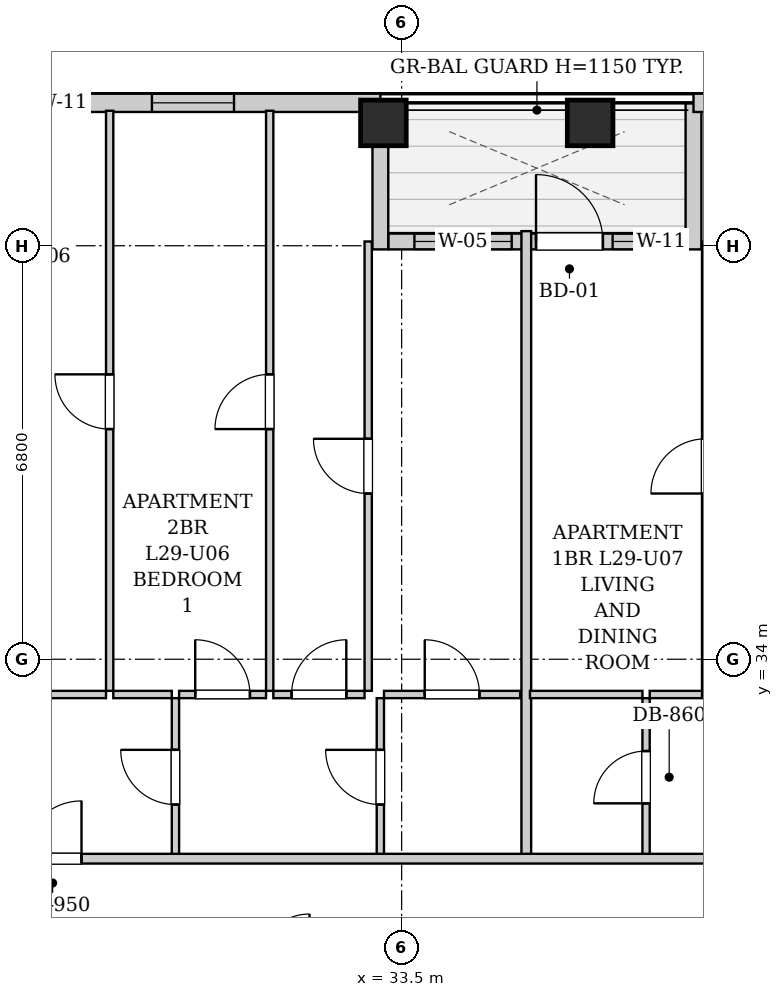
"""IFC4 building model, lengths in metres.
Left out: names, types, materials, properties, quantities, classifications, styles, units other than length and angle.
Written with IfcOpenShell. Run it as: python <this file> out.ifc"""

import sys

from ifc_helpers import new_model, si_unit, direction, frame, frame_2d, origin, origin_2d, place, context, subcontext, project, spatial, rectangle, extrude, element, fill, save


model = new_model("IFC4")
c1 = context("Model", 3, precision=1e-05, world=origin(), true_north=direction((0.0, 1.0)))
c2 = subcontext(c1, "Body", "Model", "MODEL_VIEW")
j1 = project(units=[si_unit("LENGTHUNIT", "METRE"), si_unit("PLANEANGLEUNIT", "RADIAN")], contexts=[c1])
p1 = place(None, origin())
s1 = spatial("IfcSite", under=j1, at=p1, CompositionType="ELEMENT")
p2 = place(p1, origin())
s2 = spatial("IfcBuilding", under=s1, at=p2, CompositionType="ELEMENT")
p3 = place(p2, frame((0.0, 0.0, 103.9)))
s3 = spatial("IfcBuildingStorey", under=s2, at=p3, CompositionType="ELEMENT", Elevation=103.9)
for number, where, z_axis, x_axis in (
    (1, (33.2, 42.82, 0.0), (0.0, 0.0, 1.0), (1.0, 0.0, 0.0)),
    (2, (36.6, 42.82, 0.0), (0.0, 0.0, 1.0), (1.0, 0.0, 0.0)),
):
    element("IfcColumn", number, at=place(p3, frame(where, z_axis=z_axis, x_axis=x_axis)), inside=s3, PredefinedType="COLUMN", context=c2, shape_type="SweptSolid", body=[
        extrude(rectangle(XDim=0.75, YDim=0.75, at=origin_2d()), origin(), (0.0, 0.0, 1.0), 3.2),
    ])
p4 = place(p3, frame((10.0, 43.15, 0.0), z_axis=(0.0, 0.0, 1.0), x_axis=(1.0, 0.0, 0.0)))
e3 = element("IfcWall", 3, at=p4, inside=s3, PredefinedType="SOLIDWALL", context=c2, shape_type="SweptSolid", body=[
    extrude(rectangle(XDim=23.15, YDim=0.3, at=frame_2d((11.575, 0.0))), origin(), (0.0, 0.0, 1.0), 2.94),
])
p5 = place(p4, frame((4.735, 0.0, 0.55)))
e4 = element("IfcOpeningElement", 4, at=p5, cuts=e3, PredefinedType="OPENING", context=c2, shape_type="SweptSolid", body=[
    extrude(rectangle(XDim=1.35, YDim=1.2, at=frame_2d((0.675, 0.6))), frame((0.0, 0.16, 0.0), z_axis=(0.0, -1.0, 0.0), x_axis=(1.0, 0.0, 0.0)), (0.0, 0.0, 1.0), 0.32),
])
p6 = place(p4, frame((1.27, 0.0, 0.55)))
e5 = element("IfcOpeningElement", 5, at=p6, cuts=e3, PredefinedType="OPENING", context=c2, shape_type="SweptSolid", body=[
    extrude(rectangle(XDim=1.35, YDim=1.2, at=frame_2d((0.675, 0.6))), frame((0.0, 0.16, 0.0), z_axis=(0.0, -1.0, 0.0), x_axis=(1.0, 0.0, 0.0)), (0.0, 0.0, 1.0), 0.32),
])
p7 = place(p4, frame((9.773, 0.0, 0.55)))
e6 = element("IfcOpeningElement", 6, at=p7, cuts=e3, PredefinedType="OPENING", context=c2, shape_type="SweptSolid", body=[
    extrude(rectangle(XDim=1.35, YDim=1.2, at=frame_2d((0.675, 0.6))), frame((0.0, 0.16, 0.0), z_axis=(0.0, -1.0, 0.0), x_axis=(1.0, 0.0, 0.0)), (0.0, 0.0, 1.0), 0.32),
])
p8 = place(p4, frame((17.5, 0.0, 0.55)))
e7 = element("IfcOpeningElement", 7, at=p8, cuts=e3, PredefinedType="OPENING", context=c2, shape_type="SweptSolid", body=[
    extrude(rectangle(XDim=0.85, YDim=1.2, at=frame_2d((0.425, 0.6))), frame((0.0, 0.16, 0.0), z_axis=(0.0, -1.0, 0.0), x_axis=(1.0, 0.0, 0.0)), (0.0, 0.0, 1.0), 0.32),
])
p9 = place(p4, frame((19.393, 0.0, 0.55)))
e8 = element("IfcOpeningElement", 8, at=p9, cuts=e3, PredefinedType="OPENING", context=c2, shape_type="SweptSolid", body=[
    extrude(rectangle(XDim=1.35, YDim=1.2, at=frame_2d((0.675, 0.6))), frame((0.0, 0.16, 0.0), z_axis=(0.0, -1.0, 0.0), x_axis=(1.0, 0.0, 0.0)), (0.0, 0.0, 1.0), 0.32),
])
p10 = place(p3, frame((33.15, 43.14, 0.0), z_axis=(0.0, 0.0, 1.0), x_axis=(0.0, -1.0, 0.0)))
e9 = element("IfcWall", 9, at=p10, inside=s3, PredefinedType="SOLIDWALL", context=c2, shape_type="SweptSolid", body=[
    extrude(rectangle(XDim=2.4, YDim=0.26, at=frame_2d((1.2, 0.0))), origin(), (0.0, 0.0, 1.0), 2.313),
])
p11 = place(p3, frame((33.284, 40.87, 0.0), z_axis=(0.0, 0.0, 1.0), x_axis=(1.0, 0.0, 0.0)))
e10 = element("IfcWall", 10, at=p11, inside=s3, PredefinedType="SOLIDWALL", context=c2, shape_type="SweptSolid", body=[
    extrude(rectangle(XDim=4.882, YDim=0.26, at=frame_2d((2.441, 0.0))), origin(), (0.0, 0.0, 1.0), 2.94),
])
p12 = place(p11, frame((2.426, 0.0, 0.0)))
e11 = element("IfcOpeningElement", 11, at=p12, cuts=e10, PredefinedType="OPENING", context=c2, shape_type="SweptSolid", body=[
    extrude(rectangle(XDim=1.1, YDim=2.0, at=frame_2d((0.55, 1.0))), frame((0.0, 0.14, 0.0), z_axis=(0.0, -1.0, 0.0), x_axis=(1.0, 0.0, 0.0)), (0.0, 0.0, 1.0), 0.28),
])
p13 = place(p11, frame((0.426, 0.0, 0.85)))
e12 = element("IfcOpeningElement", 12, at=p13, cuts=e10, PredefinedType="OPENING", context=c2, shape_type="SweptSolid", body=[
    extrude(rectangle(XDim=1.6, YDim=1.65, at=frame_2d((0.8, 0.825))), frame((0.0, 0.14, 0.0), z_axis=(0.0, -1.0, 0.0), x_axis=(1.0, 0.0, 0.0)), (0.0, 0.0, 1.0), 0.28),
])
p14 = place(p11, frame((3.686, 0.0, 0.55)))
e13 = element("IfcOpeningElement", 13, at=p14, cuts=e10, PredefinedType="OPENING", context=c2, shape_type="SweptSolid", body=[
    extrude(rectangle(XDim=0.85, YDim=1.2, at=frame_2d((0.425, 0.6))), frame((0.0, 0.14, 0.0), z_axis=(0.0, -1.0, 0.0), x_axis=(1.0, 0.0, 0.0)), (0.0, 0.0, 1.0), 0.28),
])
p15 = place(p3, frame((38.3, 40.74, 0.0), z_axis=(0.0, 0.0, 1.0), x_axis=(0.0, 1.0, 0.0)))
e14 = element("IfcWall", 14, at=p15, inside=s3, PredefinedType="SOLIDWALL", context=c2, shape_type="SweptSolid", body=[
    extrude(rectangle(XDim=2.4, YDim=0.26, at=frame_2d((1.2, 0.0))), origin(), (0.0, 0.0, 1.0), 2.94),
])
p16 = place(p3, frame((38.3, 43.15, 0.0), z_axis=(0.0, 0.0, 1.0), x_axis=(1.0, 0.0, 0.0)))
e15 = element("IfcWall", 15, at=p16, inside=s3, PredefinedType="SOLIDWALL", context=c2, shape_type="SweptSolid", body=[
    extrude(rectangle(XDim=2.6, YDim=0.3, at=frame_2d((1.3, 0.0))), origin(), (0.0, 0.0, 1.0), 2.94),
])
p17 = place(p16, frame((0.615, 0.0, 0.55)))
e16 = element("IfcOpeningElement", 16, at=p17, cuts=e15, PredefinedType="OPENING", context=c2, shape_type="SweptSolid", body=[
    extrude(rectangle(XDim=0.85, YDim=1.2, at=frame_2d((0.425, 0.6))), frame((0.0, 0.16, 0.0), z_axis=(0.0, -1.0, 0.0), x_axis=(1.0, 0.0, 0.0)), (0.0, 0.0, 1.0), 0.32),
])
p18 = place(p3, frame((29.78, 30.76, 0.0), z_axis=(0.0, 0.0, 1.0), x_axis=(0.0, 1.0, 0.0)))
e17 = element("IfcWall", 17, at=p18, inside=s3, PredefinedType="PARTITIONING", context=c2, shape_type="SweptSolid", body=[
    extrude(rectangle(XDim=2.6, YDim=0.12, at=frame_2d((1.3, 0.0))), origin(), (0.0, 0.0, 1.0), 2.94),
])
p19 = place(p18, frame((0.85, 0.0, 0.0)))
e18 = element("IfcOpeningElement", 18, at=p19, cuts=e17, PredefinedType="OPENING", context=c2, shape_type="SweptSolid", body=[
    extrude(rectangle(XDim=0.9, YDim=2.05, at=frame_2d((0.45, 1.025))), frame((0.0, 0.07, 0.0), z_axis=(0.0, -1.0, 0.0), x_axis=(1.0, 0.0, 0.0)), (0.0, 0.0, 1.0), 0.14),
])
p20 = place(p3, frame((25.8, 33.42, 0.0), z_axis=(0.0, 0.0, 1.0), x_axis=(1.0, 0.0, 0.0)))
e19 = element("IfcWall", 19, at=p20, inside=s3, PredefinedType="PARTITIONING", context=c2, shape_type="SweptSolid", body=[
    extrude(rectangle(XDim=2.838, YDim=0.12, at=frame_2d((1.419, 0.0))), origin(), (0.0, 0.0, 1.0), 2.94),
])
p21 = place(p20, frame((0.969, 0.0, 0.0)))
e20 = element("IfcOpeningElement", 20, at=p21, cuts=e19, PredefinedType="OPENING", context=c2, shape_type="SweptSolid", body=[
    extrude(rectangle(XDim=0.9, YDim=2.05, at=frame_2d((0.45, 1.025))), frame((0.0, 0.07, 0.0), z_axis=(0.0, -1.0, 0.0), x_axis=(1.0, 0.0, 0.0)), (0.0, 0.0, 1.0), 0.14),
])
p22 = place(p3, frame((28.758, 33.42, 0.0), z_axis=(0.0, 0.0, 1.0), x_axis=(1.0, 0.0, 0.0)))
e21 = element("IfcWall", 21, at=p22, inside=s3, PredefinedType="PARTITIONING", context=c2, shape_type="SweptSolid", body=[
    extrude(rectangle(XDim=0.962, YDim=0.12, at=frame_2d((0.481, 0.0))), origin(), (0.0, 0.0, 1.0), 2.94),
])
p23 = place(p3, frame((33.15, 30.76, 0.0), z_axis=(0.0, 0.0, 1.0), x_axis=(0.0, 1.0, 0.0)))
e22 = element("IfcWall", 22, at=p23, inside=s3, PredefinedType="PARTITIONING", context=c2, shape_type="SweptSolid", body=[
    extrude(rectangle(XDim=2.6, YDim=0.12, at=frame_2d((1.3, 0.0))), origin(), (0.0, 0.0, 1.0), 2.313),
])
p24 = place(p23, frame((0.85, 0.0, 0.0)))
e23 = element("IfcOpeningElement", 23, at=p24, cuts=e22, PredefinedType="OPENING", context=c2, shape_type="SweptSolid", body=[
    extrude(rectangle(XDim=0.9, YDim=2.05, at=frame_2d((0.45, 1.025))), frame((0.0, 0.07, 0.0), z_axis=(0.0, -1.0, 0.0), x_axis=(1.0, 0.0, 0.0)), (0.0, 0.0, 1.0), 0.14),
])
p25 = place(p3, frame((29.84, 33.42, 0.0), z_axis=(0.0, 0.0, 1.0), x_axis=(1.0, 0.0, 0.0)))
e24 = element("IfcWall", 24, at=p25, inside=s3, PredefinedType="PARTITIONING", context=c2, shape_type="SweptSolid", body=[
    extrude(rectangle(XDim=1.43, YDim=0.12, at=frame_2d((0.715, 0.0))), origin(), (0.0, 0.0, 1.0), 2.94),
])
p26 = place(p25, frame((0.265, 0.0, 0.0)))
e25 = element("IfcOpeningElement", 25, at=p26, cuts=e24, PredefinedType="OPENING", context=c2, shape_type="SweptSolid", body=[
    extrude(rectangle(XDim=0.9, YDim=2.05, at=frame_2d((0.45, 1.025))), frame((0.0, 0.07, 0.0), z_axis=(0.0, -1.0, 0.0), x_axis=(1.0, 0.0, 0.0)), (0.0, 0.0, 1.0), 0.14),
])
p27 = place(p3, frame((31.39, 33.42, 0.0), z_axis=(0.0, 0.0, 1.0), x_axis=(1.0, 0.0, 0.0)))
e26 = element("IfcWall", 26, at=p27, inside=s3, PredefinedType="PARTITIONING", context=c2, shape_type="SweptSolid", body=[
    extrude(rectangle(XDim=1.5, YDim=0.12, at=frame_2d((0.75, 0.0))), origin(), (0.0, 0.0, 1.0), 2.94),
])
p28 = place(p27, frame((0.3, 0.0, 0.0)))
e27 = element("IfcOpeningElement", 27, at=p28, cuts=e26, PredefinedType="OPENING", context=c2, shape_type="SweptSolid", body=[
    extrude(rectangle(XDim=0.9, YDim=2.05, at=frame_2d((0.45, 1.025))), frame((0.0, 0.07, 0.0), z_axis=(0.0, -1.0, 0.0), x_axis=(1.0, 0.0, 0.0)), (0.0, 0.0, 1.0), 0.14),
])
p29 = place(p3, frame((33.21, 33.42, 0.0), z_axis=(0.0, 0.0, 1.0), x_axis=(1.0, 0.0, 0.0)))
e28 = element("IfcWall", 28, at=p29, inside=s3, PredefinedType="PARTITIONING", context=c2, shape_type="SweptSolid", body=[
    extrude(rectangle(XDim=2.24, YDim=0.12, at=frame_2d((1.12, 0.0))), origin(), (0.0, 0.0, 1.0), 2.94),
])
p30 = place(p29, frame((0.67, 0.0, 0.0)))
e29 = element("IfcOpeningElement", 29, at=p30, cuts=e28, PredefinedType="OPENING", context=c2, shape_type="SweptSolid", body=[
    extrude(rectangle(XDim=0.9, YDim=2.05, at=frame_2d((0.45, 1.025))), frame((0.0, 0.07, 0.0), z_axis=(0.0, -1.0, 0.0), x_axis=(1.0, 0.0, 0.0)), (0.0, 0.0, 1.0), 0.14),
])
p31 = place(p3, frame((28.698, 33.48, 0.0), z_axis=(0.0, 0.0, 1.0), x_axis=(0.0, 1.0, 0.0)))
e30 = element("IfcWall", 30, at=p31, inside=s3, PredefinedType="PARTITIONING", context=c2, shape_type="SweptSolid", body=[
    extrude(rectangle(XDim=9.54, YDim=0.12, at=frame_2d((4.77, 0.0))), origin(), (0.0, 0.0, 1.0), 2.94),
])
p32 = place(p31, frame((4.305, 0.0, 0.0)))
e31 = element("IfcOpeningElement", 31, at=p32, cuts=e30, PredefinedType="OPENING", context=c2, shape_type="SweptSolid", body=[
    extrude(rectangle(XDim=0.9, YDim=2.05, at=frame_2d((0.45, 1.025))), frame((0.0, 0.07, 0.0), z_axis=(0.0, -1.0, 0.0), x_axis=(1.0, 0.0, 0.0)), (0.0, 0.0, 1.0), 0.14),
])
p33 = place(p3, frame((31.33, 33.48, 0.0), z_axis=(0.0, 0.0, 1.0), x_axis=(0.0, 1.0, 0.0)))
e32 = element("IfcWall", 32, at=p33, inside=s3, PredefinedType="PARTITIONING", context=c2, shape_type="SweptSolid", body=[
    extrude(rectangle(XDim=9.54, YDim=0.12, at=frame_2d((4.77, 0.0))), origin(), (0.0, 0.0, 1.0), 2.94),
])
p34 = place(p33, frame((4.305, 0.0, 0.0)))
e33 = element("IfcOpeningElement", 33, at=p34, cuts=e32, PredefinedType="OPENING", context=c2, shape_type="SweptSolid", body=[
    extrude(rectangle(XDim=0.9, YDim=2.05, at=frame_2d((0.45, 1.025))), frame((0.0, 0.07, 0.0), z_axis=(0.0, -1.0, 0.0), x_axis=(1.0, 0.0, 0.0)), (0.0, 0.0, 1.0), 0.14),
])
p35 = place(p3, frame((32.95, 33.48, 0.0), z_axis=(0.0, 0.0, 1.0), x_axis=(0.0, 1.0, 0.0)))
e34 = element("IfcWall", 34, at=p35, inside=s3, PredefinedType="PARTITIONING", context=c2, shape_type="SweptSolid", body=[
    extrude(rectangle(XDim=7.39, YDim=0.12, at=frame_2d((3.695, 0.0))), origin(), (0.0, 0.0, 1.0), 2.94),
])
p36 = place(p35, frame((3.245, 0.0, 0.0)))
e35 = element("IfcOpeningElement", 35, at=p36, cuts=e34, PredefinedType="OPENING", context=c2, shape_type="SweptSolid", body=[
    extrude(rectangle(XDim=0.9, YDim=2.05, at=frame_2d((0.45, 1.025))), frame((0.0, 0.07, 0.0), z_axis=(0.0, -1.0, 0.0), x_axis=(1.0, 0.0, 0.0)), (0.0, 0.0, 1.0), 0.14),
])
p37 = place(p3, frame((35.55, 30.76, 0.0), z_axis=(0.0, 0.0, 1.0), x_axis=(0.0, 1.0, 0.0)))
e36 = element("IfcWall", 36, at=p37, inside=s3, PredefinedType="PARTITIONING", context=c2, shape_type="SweptSolid", body=[
    extrude(rectangle(XDim=10.28, YDim=0.16, at=frame_2d((5.14, 0.0))), origin(), (0.0, 0.0, 1.0), 2.94),
])
p38 = place(p3, frame((37.52, 30.76, 0.0), z_axis=(0.0, 0.0, 1.0), x_axis=(0.0, 1.0, 0.0)))
e37 = element("IfcWall", 37, at=p38, inside=s3, PredefinedType="PARTITIONING", context=c2, shape_type="SweptSolid", body=[
    extrude(rectangle(XDim=2.6, YDim=0.12, at=frame_2d((1.3, 0.0))), origin(), (0.0, 0.0, 1.0), 2.94),
])
p39 = place(p38, frame((0.87, 0.0, 0.0)))
e38 = element("IfcOpeningElement", 38, at=p39, cuts=e37, PredefinedType="OPENING", context=c2, shape_type="SweptSolid", body=[
    extrude(rectangle(XDim=0.86, YDim=2.05, at=frame_2d((0.43, 1.025))), frame((0.0, 0.07, 0.0), z_axis=(0.0, -1.0, 0.0), x_axis=(1.0, 0.0, 0.0)), (0.0, 0.0, 1.0), 0.14),
])
p40 = place(p3, frame((35.61, 33.42, 0.0), z_axis=(0.0, 0.0, 1.0), x_axis=(1.0, 0.0, 0.0)))
e39 = element("IfcWall", 39, at=p40, inside=s3, PredefinedType="PARTITIONING", context=c2, shape_type="SweptSolid", body=[
    extrude(rectangle(XDim=1.85, YDim=0.12, at=frame_2d((0.925, 0.0))), origin(), (0.0, 0.0, 1.0), 2.94),
])
p41 = place(p3, frame((37.58, 33.42, 0.0), z_axis=(0.0, 0.0, 1.0), x_axis=(1.0, 0.0, 0.0)))
e40 = element("IfcWall", 40, at=p41, inside=s3, PredefinedType="PARTITIONING", context=c2, shape_type="SweptSolid", body=[
    extrude(rectangle(XDim=0.86, YDim=0.12, at=frame_2d((0.43, 0.0))), origin(), (0.0, 0.0, 1.0), 2.94),
])
p42 = place(p3, frame((38.5, 33.48, 0.0), z_axis=(0.0, 0.0, 1.0), x_axis=(0.0, 1.0, 0.0)))
e41 = element("IfcWall", 41, at=p42, inside=s3, PredefinedType="PARTITIONING", context=c2, shape_type="SweptSolid", body=[
    extrude(rectangle(XDim=7.39, YDim=0.12, at=frame_2d((3.695, 0.0))), origin(), (0.0, 0.0, 1.0), 2.94),
])
p43 = place(p42, frame((3.245, 0.0, 0.0)))
e42 = element("IfcOpeningElement", 42, at=p43, cuts=e41, PredefinedType="OPENING", context=c2, shape_type="SweptSolid", body=[
    extrude(rectangle(XDim=0.9, YDim=2.05, at=frame_2d((0.45, 1.025))), frame((0.0, 0.07, 0.0), z_axis=(0.0, -1.0, 0.0), x_axis=(1.0, 0.0, 0.0)), (0.0, 0.0, 1.0), 0.14),
])
p44 = place(p3, frame((10.05, 30.72, 0.0), z_axis=(0.0, 0.0, 1.0), x_axis=(1.0, 0.0, 0.0)))
e43 = element("IfcWall", 43, at=p44, inside=s3, PredefinedType="PARTITIONING", context=c2, shape_type="SweptSolid", body=[
    extrude(rectangle(XDim=30.8, YDim=0.16, at=frame_2d((15.4, 0.0))), origin(), (0.0, 0.0, 1.0), 2.94),
])
p45 = place(p44, frame((3.692, 0.0, 0.0)))
e44 = element("IfcOpeningElement", 44, at=p45, cuts=e43, PredefinedType="OPENING", context=c2, shape_type="SweptSolid", body=[
    extrude(rectangle(XDim=0.95, YDim=2.1, at=frame_2d((0.475, 1.05))), frame((0.0, 0.09, 0.0), z_axis=(0.0, -1.0, 0.0), x_axis=(1.0, 0.0, 0.0)), (0.0, 0.0, 1.0), 0.18),
])
p46 = place(p44, frame((11.785, 0.0, 0.0)))
e45 = element("IfcOpeningElement", 45, at=p46, cuts=e43, PredefinedType="OPENING", context=c2, shape_type="SweptSolid", body=[
    extrude(rectangle(XDim=0.95, YDim=2.1, at=frame_2d((0.475, 1.05))), frame((0.0, 0.09, 0.0), z_axis=(0.0, -1.0, 0.0), x_axis=(1.0, 0.0, 0.0)), (0.0, 0.0, 1.0), 0.18),
])
p47 = place(p44, frame((17.235, 0.0, 0.0)))
e46 = element("IfcOpeningElement", 46, at=p47, cuts=e43, PredefinedType="OPENING", context=c2, shape_type="SweptSolid", body=[
    extrude(rectangle(XDim=0.95, YDim=2.1, at=frame_2d((0.475, 1.05))), frame((0.0, 0.09, 0.0), z_axis=(0.0, -1.0, 0.0), x_axis=(1.0, 0.0, 0.0)), (0.0, 0.0, 1.0), 0.18),
])
p48 = place(p44, frame((28.64, 0.0, 0.0)))
e47 = element("IfcOpeningElement", 47, at=p48, cuts=e43, PredefinedType="OPENING", context=c2, shape_type="SweptSolid", body=[
    extrude(rectangle(XDim=0.95, YDim=2.1, at=frame_2d((0.475, 1.05))), frame((0.0, 0.09, 0.0), z_axis=(0.0, -1.0, 0.0), x_axis=(1.0, 0.0, 0.0)), (0.0, 0.0, 1.0), 0.18),
])
p49 = place(p19, origin())
e48 = element("IfcDoor", 48, at=p49, inside=s3, OperationType="SINGLE_SWING_RIGHT", PredefinedType="DOOR", context=c2, shape_type="SweptSolid", body=[
    extrude(rectangle(XDim=0.9, YDim=2.05, at=frame_2d((0.45, 1.025))), frame((0.0, 0.025, 0.0), z_axis=(0.0, -1.0, 0.0), x_axis=(1.0, 0.0, 0.0)), (0.0, 0.0, 1.0), 0.05),
])
fill(e18, e48)
p50 = place(p24, origin())
e49 = element("IfcDoor", 49, at=p50, inside=s3, OperationType="SINGLE_SWING_RIGHT", PredefinedType="DOOR", context=c2, shape_type="SweptSolid", body=[
    extrude(rectangle(XDim=0.9, YDim=2.05, at=frame_2d((0.45, 1.025))), frame((0.0, 0.025, 0.0), z_axis=(0.0, -1.0, 0.0), x_axis=(1.0, 0.0, 0.0)), (0.0, 0.0, 1.0), 0.05),
])
fill(e23, e49)
p51 = place(p26, origin())
e50 = element("IfcDoor", 50, at=p51, inside=s3, OperationType="SINGLE_SWING_LEFT", PredefinedType="DOOR", context=c2, shape_type="SweptSolid", body=[
    extrude(rectangle(XDim=0.9, YDim=2.05, at=frame_2d((0.45, 1.025))), frame((0.0, 0.025, 0.0), z_axis=(0.0, -1.0, 0.0), x_axis=(1.0, 0.0, 0.0)), (0.0, 0.0, 1.0), 0.05),
])
fill(e25, e50)
p52 = place(p28, origin())
e51 = element("IfcDoor", 51, at=p52, inside=s3, OperationType="SINGLE_SWING_RIGHT", PredefinedType="DOOR", context=c2, shape_type="SweptSolid", body=[
    extrude(rectangle(XDim=0.9, YDim=2.05, at=frame_2d((0.45, 1.025))), frame((0.0, 0.025, 0.0), z_axis=(0.0, -1.0, 0.0), x_axis=(1.0, 0.0, 0.0)), (0.0, 0.0, 1.0), 0.05),
])
fill(e27, e51)
p53 = place(p30, origin())
e52 = element("IfcDoor", 52, at=p53, inside=s3, OperationType="SINGLE_SWING_LEFT", PredefinedType="DOOR", context=c2, shape_type="SweptSolid", body=[
    extrude(rectangle(XDim=0.9, YDim=2.05, at=frame_2d((0.45, 1.025))), frame((0.0, 0.025, 0.0), z_axis=(0.0, -1.0, 0.0), x_axis=(1.0, 0.0, 0.0)), (0.0, 0.0, 1.0), 0.05),
])
fill(e29, e52)
p54 = place(p32, origin())
e53 = element("IfcDoor", 53, at=p54, inside=s3, OperationType="SINGLE_SWING_RIGHT", PredefinedType="DOOR", context=c2, shape_type="SweptSolid", body=[
    extrude(rectangle(XDim=0.9, YDim=2.05, at=frame_2d((0.45, 1.025))), frame((0.0, 0.025, 0.0), z_axis=(0.0, -1.0, 0.0), x_axis=(1.0, 0.0, 0.0)), (0.0, 0.0, 1.0), 0.05),
])
fill(e31, e53)
p55 = place(p34, origin())
e54 = element("IfcDoor", 54, at=p55, inside=s3, OperationType="SINGLE_SWING_LEFT", PredefinedType="DOOR", context=c2, shape_type="SweptSolid", body=[
    extrude(rectangle(XDim=0.9, YDim=2.05, at=frame_2d((0.45, 1.025))), frame((0.0, 0.025, 0.0), z_axis=(0.0, -1.0, 0.0), x_axis=(1.0, 0.0, 0.0)), (0.0, 0.0, 1.0), 0.05),
])
fill(e33, e54)
p56 = place(p36, origin())
e55 = element("IfcDoor", 55, at=p56, inside=s3, OperationType="SINGLE_SWING_RIGHT", PredefinedType="DOOR", context=c2, shape_type="SweptSolid", body=[
    extrude(rectangle(XDim=0.9, YDim=2.05, at=frame_2d((0.45, 1.025))), frame((0.0, 0.025, 0.0), z_axis=(0.0, -1.0, 0.0), x_axis=(1.0, 0.0, 0.0)), (0.0, 0.0, 1.0), 0.05),
])
fill(e35, e55)
p57 = place(p39, origin())
e56 = element("IfcDoor", 56, at=p57, inside=s3, OperationType="SINGLE_SWING_LEFT", PredefinedType="DOOR", context=c2, shape_type="SweptSolid", body=[
    extrude(rectangle(XDim=0.86, YDim=2.05, at=frame_2d((0.43, 1.025))), frame((0.0, 0.025, 0.0), z_axis=(0.0, -1.0, 0.0), x_axis=(1.0, 0.0, 0.0)), (0.0, 0.0, 1.0), 0.05),
])
fill(e38, e56)
p58 = place(p47, origin())
e57 = element("IfcDoor", 57, at=p58, inside=s3, OperationType="SINGLE_SWING_RIGHT", PredefinedType="DOOR", context=c2, shape_type="SweptSolid", body=[
    extrude(rectangle(XDim=0.95, YDim=2.1, at=frame_2d((0.475, 1.05))), frame((0.0, 0.025, 0.0), z_axis=(0.0, -1.0, 0.0), x_axis=(1.0, 0.0, 0.0)), (0.0, 0.0, 1.0), 0.05),
])
fill(e46, e57)
p59 = place(p12, origin())
e58 = element("IfcDoor", 58, at=p59, inside=s3, OperationType="SINGLE_SWING_LEFT", PredefinedType="DOOR", context=c2, shape_type="SweptSolid", body=[
    extrude(rectangle(XDim=1.1, YDim=2.0, at=frame_2d((0.55, 1.0))), frame((0.0, 0.025, 0.0), z_axis=(0.0, -1.0, 0.0), x_axis=(1.0, 0.0, 0.0)), (0.0, 0.0, 1.0), 0.05),
])
fill(e11, e58)
p60 = place(p8, origin())
e59 = element("IfcWindow", 59, at=p60, inside=s3, PartitioningType="SINGLE_PANEL", PredefinedType="WINDOW", context=c2, shape_type="SweptSolid", body=[
    extrude(rectangle(XDim=0.85, YDim=1.2, at=frame_2d((0.425, 0.6))), frame((0.0, 0.03, 0.0), z_axis=(0.0, -1.0, 0.0), x_axis=(1.0, 0.0, 0.0)), (0.0, 0.0, 1.0), 0.06),
])
fill(e7, e59)
p61 = place(p9, origin())
e60 = element("IfcWindow", 60, at=p61, inside=s3, PartitioningType="SINGLE_PANEL", PredefinedType="WINDOW", context=c2, shape_type="SweptSolid", body=[
    extrude(rectangle(XDim=1.35, YDim=1.2, at=frame_2d((0.675, 0.6))), frame((0.0, 0.03, 0.0), z_axis=(0.0, -1.0, 0.0), x_axis=(1.0, 0.0, 0.0)), (0.0, 0.0, 1.0), 0.06),
])
fill(e8, e60)
p62 = place(p13, origin())
e61 = element("IfcWindow", 61, at=p62, inside=s3, PartitioningType="DOUBLE_PANEL_VERTICAL", PredefinedType="WINDOW", context=c2, shape_type="SweptSolid", body=[
    extrude(rectangle(XDim=1.6, YDim=1.65, at=frame_2d((0.8, 0.825))), frame((0.0, 0.03, 0.0), z_axis=(0.0, -1.0, 0.0), x_axis=(1.0, 0.0, 0.0)), (0.0, 0.0, 1.0), 0.06),
])
fill(e12, e61)
p63 = place(p14, origin())
e62 = element("IfcWindow", 62, at=p63, inside=s3, PartitioningType="SINGLE_PANEL", PredefinedType="WINDOW", context=c2, shape_type="SweptSolid", body=[
    extrude(rectangle(XDim=0.85, YDim=1.2, at=frame_2d((0.425, 0.6))), frame((0.0, 0.03, 0.0), z_axis=(0.0, -1.0, 0.0), x_axis=(1.0, 0.0, 0.0)), (0.0, 0.0, 1.0), 0.06),
])
fill(e13, e62)
save(model, sys.argv[1])
